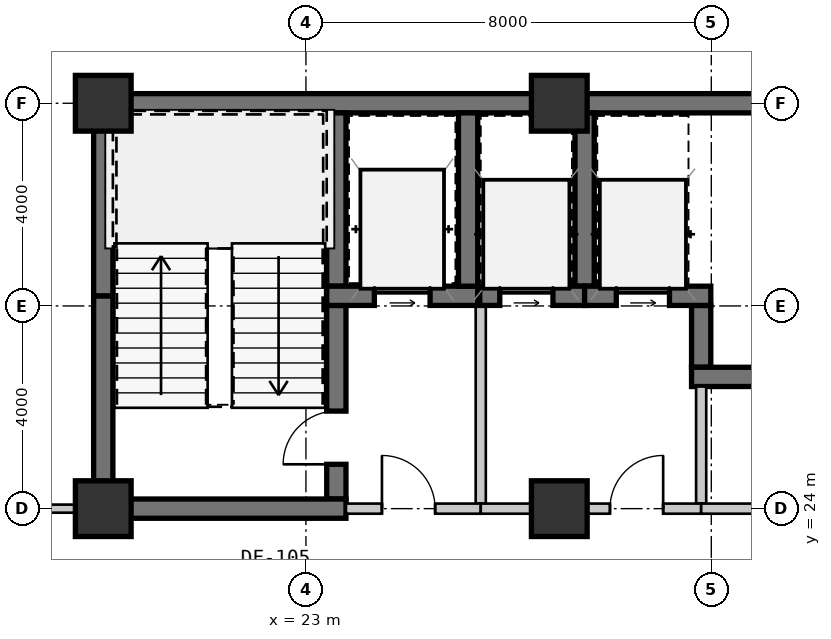
"""IFC4 building model, lengths in metres.
Left out: names, types, materials, properties, quantities, classifications, styles, units other than length and angle.
Written with IfcOpenShell. Run it as: python <this file> out.ifc"""

import sys

from ifc_helpers import new_model, si_unit, direction, frame, frame_2d, origin, origin_2d, place, context, subcontext, project, spatial, rectangle, extrude, source, transform, mapped, element, fill, save


model = new_model("IFC4")
c1 = context("Model", 3, precision=1e-05, world=origin(), true_north=direction((0.0, 1.0)))
c2 = subcontext(c1, "Body", "Model", "MODEL_VIEW")
j1 = project(units=[si_unit("LENGTHUNIT", "METRE"), si_unit("PLANEANGLEUNIT", "RADIAN")], contexts=[c1])
p1 = place(None, origin())
s1 = spatial("IfcSite", under=j1, at=p1, CompositionType="ELEMENT")
p2 = place(p1, origin())
s2 = spatial("IfcBuilding", under=s1, at=p2, CompositionType="ELEMENT")
p3 = place(p2, frame((0.0, 0.0, 16.8)))
s3 = spatial("IfcBuildingStorey", under=s2, at=p3, CompositionType="ELEMENT", Elevation=16.8)
m1 = source(origin(), c2, "Body", "SweptSolid", [
    extrude(rectangle(XDim=1.1, YDim=1.1, at=origin_2d()), origin(), (0.0, 0.0, 1.0), 3.15),
])
for number, where, z_axis, x_axis in (
    (1, (19.0, 24.0, 0.0), (0.0, 0.0, 1.0), (1.0, 0.0, 0.0)),
    (2, (28.0, 24.0, 0.0), (0.0, 0.0, 1.0), (1.0, 0.0, 0.0)),
    (3, (19.0, 32.0, 0.0), (0.0, 0.0, 1.0), (1.0, 0.0, 0.0)),
    (4, (28.0, 32.0, 0.0), (0.0, 0.0, 1.0), (1.0, 0.0, 0.0)),
):
    element("IfcColumn", number, at=place(p3, frame(where, z_axis=z_axis, x_axis=x_axis)), inside=s3, PredefinedType="COLUMN", context=c2, shape_type="MappedRepresentation", body=[
        mapped(m1, transform((0.0, 0.0, 0.0), scale=1.0)),
    ])
m2 = source(origin(), c2, "Body", "SweptSolid", [
    extrude(rectangle(XDim=9.19, YDim=0.38, at=frame_2d((4.595, 0.0))), origin(), (0.0, 0.0, 1.0), 2.93),
])
p4 = place(p3, frame((18.81, 32.0, 0.0), z_axis=(0.0, 0.0, 1.0), x_axis=(1.0, 0.0, 0.0)))
e5 = element("IfcWall", 5, at=p4, inside=s3, PredefinedType="SHEAR", context=c2, shape_type="MappedRepresentation", body=[
    mapped(m2, transform((0.0, 0.0, 0.0), scale=1.0)),
])
m3 = source(origin(), c2, "Body", "SweptSolid", [
    extrude(rectangle(XDim=11.2, YDim=0.38, at=frame_2d((5.6, 0.0))), origin(), (0.0, 0.0, 1.0), 2.93),
])
p5 = place(p3, frame((28.0, 32.0, 0.0), z_axis=(0.0, 0.0, 1.0), x_axis=(1.0, 0.0, 0.0)))
e6 = element("IfcWall", 6, at=p5, inside=s3, PredefinedType="SHEAR", context=c2, shape_type="MappedRepresentation", body=[
    mapped(m3, transform((0.0, 0.0, 0.0), scale=1.0)),
])
m4 = source(origin(), c2, "Body", "SweptSolid", [
    extrude(rectangle(XDim=4.01, YDim=0.38, at=frame_2d((2.005, 0.0))), origin(), (0.0, 0.0, 1.0), 2.93),
])
p6 = place(p3, frame((19.0, 24.19, 0.0), z_axis=(0.0, 0.0, 1.0), x_axis=(0.0, 1.0, 0.0)))
e7 = element("IfcWall", 7, at=p6, inside=s3, PredefinedType="SHEAR", context=c2, shape_type="MappedRepresentation", body=[
    mapped(m4, transform((0.0, 0.0, 0.0), scale=1.0)),
])
m5 = source(origin(), c2, "Body", "SweptSolid", [
    extrude(rectangle(XDim=3.61, YDim=0.38, at=frame_2d((1.805, 0.0))), origin(), (0.0, 0.0, 1.0), 2.93),
])
p7 = place(p3, frame((19.0, 28.2, 0.0), z_axis=(0.0, 0.0, 1.0), x_axis=(0.0, 1.0, 0.0)))
e8 = element("IfcWall", 8, at=p7, inside=s3, PredefinedType="SHEAR", context=c2, shape_type="MappedRepresentation", body=[
    mapped(m5, transform((0.0, 0.0, 0.0), scale=1.0)),
])
m6 = source(origin(), c2, "Body", "SweptSolid", [
    extrude(rectangle(XDim=3.42, YDim=0.38, at=frame_2d((1.71, 0.0))), origin(), (0.0, 0.0, 1.0), 2.93),
])
p8 = place(p3, frame((23.6, 28.39, 0.0), z_axis=(0.0, 0.0, 1.0), x_axis=(0.0, 1.0, 0.0)))
e9 = element("IfcWall", 9, at=p8, inside=s3, PredefinedType="SHEAR", context=c2, shape_type="MappedRepresentation", body=[
    mapped(m6, transform((0.0, 0.0, 0.0), scale=1.0)),
])
m7 = source(origin(), c2, "Body", "SweptSolid", [
    extrude(rectangle(XDim=3.82, YDim=0.38, at=frame_2d((1.91, 0.0))), origin(), (0.0, 0.0, 1.0), 2.93),
])
p9 = place(p3, frame((23.6, 24.19, 0.0), z_axis=(0.0, 0.0, 1.0), x_axis=(0.0, 1.0, 0.0)))
e10 = element("IfcWall", 10, at=p9, inside=s3, PredefinedType="SHEAR", context=c2, shape_type="MappedRepresentation", body=[
    mapped(m7, transform((0.0, 0.0, 0.0), scale=1.0)),
])
m8 = source(origin(), c2, "Body", "SweptSolid", [
    extrude(rectangle(XDim=1.05, YDim=2.1, at=frame_2d((0.525, 1.05))), frame((0.0, 0.2, 0.0), z_axis=(0.0, -1.0, 0.0), x_axis=(1.0, 0.0, 0.0)), (0.0, 0.0, 1.0), 0.4),
])
p10 = place(p9, frame((0.685, 0.0, 0.0)))
e11 = element("IfcOpeningElement", 11, at=p10, cuts=e10, PredefinedType="OPENING", context=c2, shape_type="MappedRepresentation", body=[
    mapped(m8, transform((0.0, 0.0, 0.0), scale=1.0)),
])
m9 = source(origin(), c2, "Body", "SweptSolid", [
    extrude(rectangle(XDim=4.98, YDim=0.38, at=frame_2d((2.49, 0.0))), origin(), (0.0, 0.0, 1.0), 2.93),
])
p11 = place(p3, frame((18.81, 24.0, 0.0), z_axis=(0.0, 0.0, 1.0), x_axis=(1.0, 0.0, 0.0)))
e12 = element("IfcWall", 12, at=p11, inside=s3, PredefinedType="SHEAR", context=c2, shape_type="MappedRepresentation", body=[
    mapped(m9, transform((0.0, 0.0, 0.0), scale=1.0)),
])
m10 = source(origin(), c2, "Body", "SweptSolid", [
    extrude(rectangle(XDim=2.98, YDim=0.38, at=frame_2d((1.49, 0.0))), origin(), (0.0, 0.0, 1.0), 2.93),
])
p12 = place(p3, frame((23.41, 28.2, 0.0), z_axis=(0.0, 0.0, 1.0), x_axis=(1.0, 0.0, 0.0)))
e13 = element("IfcWall", 13, at=p12, inside=s3, PredefinedType="SHEAR", context=c2, shape_type="MappedRepresentation", body=[
    mapped(m10, transform((0.0, 0.0, 0.0), scale=1.0)),
])
m11 = source(origin(), c2, "Body", "SweptSolid", [
    extrude(rectangle(XDim=1.1, YDim=2.15, at=frame_2d((0.55, 1.075))), frame((0.0, 0.2, 0.0), z_axis=(0.0, -1.0, 0.0), x_axis=(1.0, 0.0, 0.0)), (0.0, 0.0, 1.0), 0.4),
])
p13 = place(p12, frame((0.94, 0.0, 0.0)))
e14 = element("IfcOpeningElement", 14, at=p13, cuts=e13, PredefinedType="OPENING", context=c2, shape_type="MappedRepresentation", body=[
    mapped(m11, transform((0.0, 0.0, 0.0), scale=1.0)),
])
p14 = place(p3, frame((26.2, 28.39, 0.0), z_axis=(0.0, 0.0, 1.0), x_axis=(0.0, 1.0, 0.0)))
e15 = element("IfcWall", 15, at=p14, inside=s3, PredefinedType="SHEAR", context=c2, shape_type="MappedRepresentation", body=[
    mapped(m6, transform((0.0, 0.0, 0.0), scale=1.0)),
])
m12 = source(origin(), c2, "Body", "SweptSolid", [
    extrude(rectangle(XDim=3.91, YDim=0.2, at=frame_2d((1.955, 0.0))), origin(), (0.0, 0.0, 1.0), 2.93),
])
p15 = place(p3, frame((26.45, 24.1, 0.0), z_axis=(0.0, 0.0, 1.0), x_axis=(0.0, 1.0, 0.0)))
e16 = element("IfcWall", 16, at=p15, inside=s3, PredefinedType="SOLIDWALL", context=c2, shape_type="MappedRepresentation", body=[
    mapped(m12, transform((0.0, 0.0, 0.0), scale=1.0)),
])
m13 = source(origin(), c2, "Body", "SweptSolid", [
    extrude(rectangle(XDim=2.66, YDim=0.2, at=frame_2d((1.33, 0.0))), origin(), (0.0, 0.0, 1.0), 2.47),
])
p16 = place(p3, frame((23.79, 24.0, 0.0), z_axis=(0.0, 0.0, 1.0), x_axis=(1.0, 0.0, 0.0)))
e17 = element("IfcWall", 17, at=p16, inside=s3, PredefinedType="SOLIDWALL", context=c2, shape_type="MappedRepresentation", body=[
    mapped(m13, transform((0.0, 0.0, 0.0), scale=1.0)),
])
m14 = source(origin(), c2, "Body", "SweptSolid", [
    extrude(rectangle(XDim=1.05, YDim=2.1, at=frame_2d((0.525, 1.05))), frame((0.0, 0.11, 0.0), z_axis=(0.0, -1.0, 0.0), x_axis=(1.0, 0.0, 0.0)), (0.0, 0.0, 1.0), 0.22),
])
p17 = place(p16, frame((0.71, 0.0, 0.0)))
e18 = element("IfcOpeningElement", 18, at=p17, cuts=e17, PredefinedType="OPENING", context=c2, shape_type="MappedRepresentation", body=[
    mapped(m14, transform((0.0, 0.0, 0.0), scale=1.0)),
])
m15 = source(origin(), c2, "Body", "SweptSolid", [
    extrude(rectangle(XDim=1.22, YDim=0.38, at=frame_2d((0.61, 0.0))), origin(), (0.0, 0.0, 1.0), 2.93),
])
p18 = place(p3, frame((30.8, 28.01, 0.0), z_axis=(0.0, 0.0, 1.0), x_axis=(0.0, -1.0, 0.0)))
e19 = element("IfcWall", 19, at=p18, inside=s3, PredefinedType="SHEAR", context=c2, shape_type="MappedRepresentation", body=[
    mapped(m15, transform((0.0, 0.0, 0.0), scale=1.0)),
])
m16 = source(origin(), c2, "Body", "SweptSolid", [
    extrude(rectangle(XDim=2.43, YDim=0.38, at=frame_2d((1.215, 0.0))), origin(), (0.0, 0.0, 1.0), 2.93),
])
p19 = place(p3, frame((30.61, 26.6, 0.0), z_axis=(0.0, 0.0, 1.0), x_axis=(1.0, 0.0, 0.0)))
e20 = element("IfcWall", 20, at=p19, inside=s3, PredefinedType="SHEAR", context=c2, shape_type="MappedRepresentation", body=[
    mapped(m16, transform((0.0, 0.0, 0.0), scale=1.0)),
])
p20 = place(p3, frame((28.5, 28.39, 0.0), z_axis=(0.0, 0.0, 1.0), x_axis=(0.0, 1.0, 0.0)))
e21 = element("IfcWall", 21, at=p20, inside=s3, PredefinedType="SHEAR", context=c2, shape_type="MappedRepresentation", body=[
    mapped(m6, transform((0.0, 0.0, 0.0), scale=1.0)),
])
m17 = source(origin(), c2, "Body", "SweptSolid", [
    extrude(rectangle(XDim=2.07, YDim=0.38, at=frame_2d((1.035, 0.0))), origin(), (0.0, 0.0, 1.0), 2.93),
])
p21 = place(p3, frame((26.43, 28.2, 0.0), z_axis=(0.0, 0.0, 1.0), x_axis=(1.0, 0.0, 0.0)))
e22 = element("IfcWall", 22, at=p21, inside=s3, PredefinedType="SHEAR", context=c2, shape_type="MappedRepresentation", body=[
    mapped(m17, transform((0.0, 0.0, 0.0), scale=1.0)),
])
m18 = source(origin(), c2, "Body", "SweptSolid", [
    extrude(rectangle(XDim=1.05, YDim=2.15, at=frame_2d((0.525, 1.075))), frame((0.0, 0.2, 0.0), z_axis=(0.0, -1.0, 0.0), x_axis=(1.0, 0.0, 0.0)), (0.0, 0.0, 1.0), 0.4),
])
p22 = place(p21, frame((0.395, 0.0, 0.0)))
e23 = element("IfcOpeningElement", 23, at=p22, cuts=e22, PredefinedType="OPENING", context=c2, shape_type="MappedRepresentation", body=[
    mapped(m18, transform((0.0, 0.0, 0.0), scale=1.0)),
])
m19 = source(origin(), c2, "Body", "SweptSolid", [
    extrude(rectangle(XDim=2.49, YDim=0.38, at=frame_2d((1.245, 0.0))), origin(), (0.0, 0.0, 1.0), 2.93),
])
p23 = place(p3, frame((28.5, 28.2, 0.0), z_axis=(0.0, 0.0, 1.0), x_axis=(1.0, 0.0, 0.0)))
e24 = element("IfcWall", 24, at=p23, inside=s3, PredefinedType="SHEAR", context=c2, shape_type="MappedRepresentation", body=[
    mapped(m19, transform((0.0, 0.0, 0.0), scale=1.0)),
])
p24 = place(p23, frame((0.625, 0.0, 0.0)))
e25 = element("IfcOpeningElement", 25, at=p24, cuts=e24, PredefinedType="OPENING", context=c2, shape_type="MappedRepresentation", body=[
    mapped(m18, transform((0.0, 0.0, 0.0), scale=1.0)),
])
m20 = source(origin(), c2, "Body", "SweptSolid", [
    extrude(rectangle(XDim=2.31, YDim=0.2, at=frame_2d((1.155, 0.0))), origin(), (0.0, 0.0, 1.0), 2.93),
])
p25 = place(p3, frame((30.8, 26.41, 0.0), z_axis=(0.0, 0.0, 1.0), x_axis=(0.0, -1.0, 0.0)))
e26 = element("IfcWall", 26, at=p25, inside=s3, PredefinedType="SOLIDWALL", context=c2, shape_type="MappedRepresentation", body=[
    mapped(m20, transform((0.0, 0.0, 0.0), scale=1.0)),
])
m21 = source(origin(), c2, "Body", "SweptSolid", [
    extrude(rectangle(XDim=4.35, YDim=0.2, at=frame_2d((2.175, 0.0))), origin(), (0.0, 0.0, 1.0), 2.47),
])
p26 = place(p3, frame((30.8, 24.0, 0.0), z_axis=(0.0, 0.0, 1.0), x_axis=(-1.0, 0.0, 0.0)))
e27 = element("IfcWall", 27, at=p26, inside=s3, PredefinedType="SOLIDWALL", context=c2, shape_type="MappedRepresentation", body=[
    mapped(m21, transform((0.0, 0.0, 0.0), scale=1.0)),
])
p27 = place(p26, frame((0.75, 0.0, 0.0)))
e28 = element("IfcOpeningElement", 28, at=p27, cuts=e27, PredefinedType="OPENING", context=c2, shape_type="MappedRepresentation", body=[
    mapped(m14, transform((0.0, 0.0, 0.0), scale=1.0)),
])
m22 = source(origin(), c2, "Body", "SweptSolid", [
    extrude(rectangle(XDim=6.4, YDim=0.2, at=frame_2d((3.2, 0.0))), origin(), (0.0, 0.0, 1.0), 2.47),
])
p28 = place(p3, frame((37.2, 24.0, 0.0), z_axis=(0.0, 0.0, 1.0), x_axis=(-1.0, 0.0, 0.0)))
e29 = element("IfcWall", 29, at=p28, inside=s3, PredefinedType="SOLIDWALL", context=c2, shape_type="MappedRepresentation", body=[
    mapped(m22, transform((0.0, 0.0, 0.0), scale=1.0)),
])
p29 = place(p28, frame((2.675, 0.0, 0.0)))
e30 = element("IfcOpeningElement", 30, at=p29, cuts=e29, PredefinedType="OPENING", context=c2, shape_type="MappedRepresentation", body=[
    mapped(m14, transform((0.0, 0.0, 0.0), scale=1.0)),
])
m23 = source(origin(), c2, "Body", "SweptSolid", [
    extrude(rectangle(XDim=4.13, YDim=0.16, at=frame_2d((2.065, 0.0))), origin(), (0.0, 0.0, 1.0), 2.93),
])
p30 = place(p3, frame((14.68, 24.0, 0.0), z_axis=(0.0, 0.0, 1.0), x_axis=(1.0, 0.0, 0.0)))
e31 = element("IfcWall", 31, at=p30, inside=s3, PredefinedType="PARTITIONING", context=c2, shape_type="MappedRepresentation", body=[
    mapped(m23, transform((0.0, 0.0, 0.0), scale=1.0)),
])
m24 = source(origin(), c2, "Body", "SweptSolid", [
    extrude(rectangle(XDim=0.92, YDim=2.1, at=frame_2d((0.46, 1.05))), frame((0.0, 0.09, 0.0), z_axis=(0.0, -1.0, 0.0), x_axis=(1.0, 0.0, 0.0)), (0.0, 0.0, 1.0), 0.18),
])
p31 = place(p30, frame((1.69, 0.0, 0.0)))
e32 = element("IfcOpeningElement", 32, at=p31, cuts=e31, PredefinedType="OPENING", context=c2, shape_type="MappedRepresentation", body=[
    mapped(m24, transform((0.0, 0.0, 0.0), scale=1.0)),
])
m25 = source(origin(), c2, "Body", "SweptSolid", [
    extrude(rectangle(XDim=1.05, YDim=2.1, at=frame_2d((0.525, 1.05))), frame((0.0, 0.025, 0.0), z_axis=(0.0, -1.0, 0.0), x_axis=(1.0, 0.0, 0.0)), (0.0, 0.0, 1.0), 0.05),
])
p32 = place(p10, origin())
e33 = element("IfcDoor", 33, at=p32, inside=s3, OperationType="SINGLE_SWING_LEFT", PredefinedType="DOOR", context=c2, shape_type="MappedRepresentation", body=[
    mapped(m25, transform((0.0, 0.0, 0.0), scale=1.0)),
])
fill(e11, e33)
m26 = source(origin(), c2, "Body", "SweptSolid", [
    extrude(rectangle(XDim=1.1, YDim=2.15, at=frame_2d((0.55, 1.075))), frame((0.0, 0.025, 0.0), z_axis=(0.0, -1.0, 0.0), x_axis=(1.0, 0.0, 0.0)), (0.0, 0.0, 1.0), 0.05),
])
p33 = place(p13, origin())
e34 = element("IfcDoor", 34, at=p33, inside=s3, OperationType="SLIDING_TO_LEFT", PredefinedType="DOOR", context=c2, shape_type="MappedRepresentation", body=[
    mapped(m26, transform((0.0, 0.0, 0.0), scale=1.0)),
])
fill(e14, e34)
p34 = place(p17, origin())
e35 = element("IfcDoor", 35, at=p34, inside=s3, OperationType="SINGLE_SWING_LEFT", PredefinedType="DOOR", context=c2, shape_type="MappedRepresentation", body=[
    mapped(m25, transform((0.0, 0.0, 0.0), scale=1.0)),
])
fill(e18, e35)
m27 = source(origin(), c2, "Body", "SweptSolid", [
    extrude(rectangle(XDim=1.05, YDim=2.15, at=frame_2d((0.525, 1.075))), frame((0.0, 0.025, 0.0), z_axis=(0.0, -1.0, 0.0), x_axis=(1.0, 0.0, 0.0)), (0.0, 0.0, 1.0), 0.05),
])
p35 = place(p22, origin())
e36 = element("IfcDoor", 36, at=p35, inside=s3, OperationType="SLIDING_TO_LEFT", PredefinedType="DOOR", context=c2, shape_type="MappedRepresentation", body=[
    mapped(m27, transform((0.0, 0.0, 0.0), scale=1.0)),
])
fill(e23, e36)
p36 = place(p24, origin())
e37 = element("IfcDoor", 37, at=p36, inside=s3, OperationType="SLIDING_TO_LEFT", PredefinedType="DOOR", context=c2, shape_type="MappedRepresentation", body=[
    mapped(m27, transform((0.0, 0.0, 0.0), scale=1.0)),
])
fill(e25, e37)
p37 = place(p27, frame((1.05, 0.0, 0.0), z_axis=(0.0, 0.0, 1.0), x_axis=(-1.0, 0.0, 0.0)))
e38 = element("IfcDoor", 38, at=p37, inside=s3, OperationType="SINGLE_SWING_RIGHT", PredefinedType="DOOR", context=c2, shape_type="MappedRepresentation", body=[
    mapped(m25, transform((0.0, 0.0, 0.0), scale=1.0)),
])
fill(e28, e38)
save(model, sys.argv[1])
